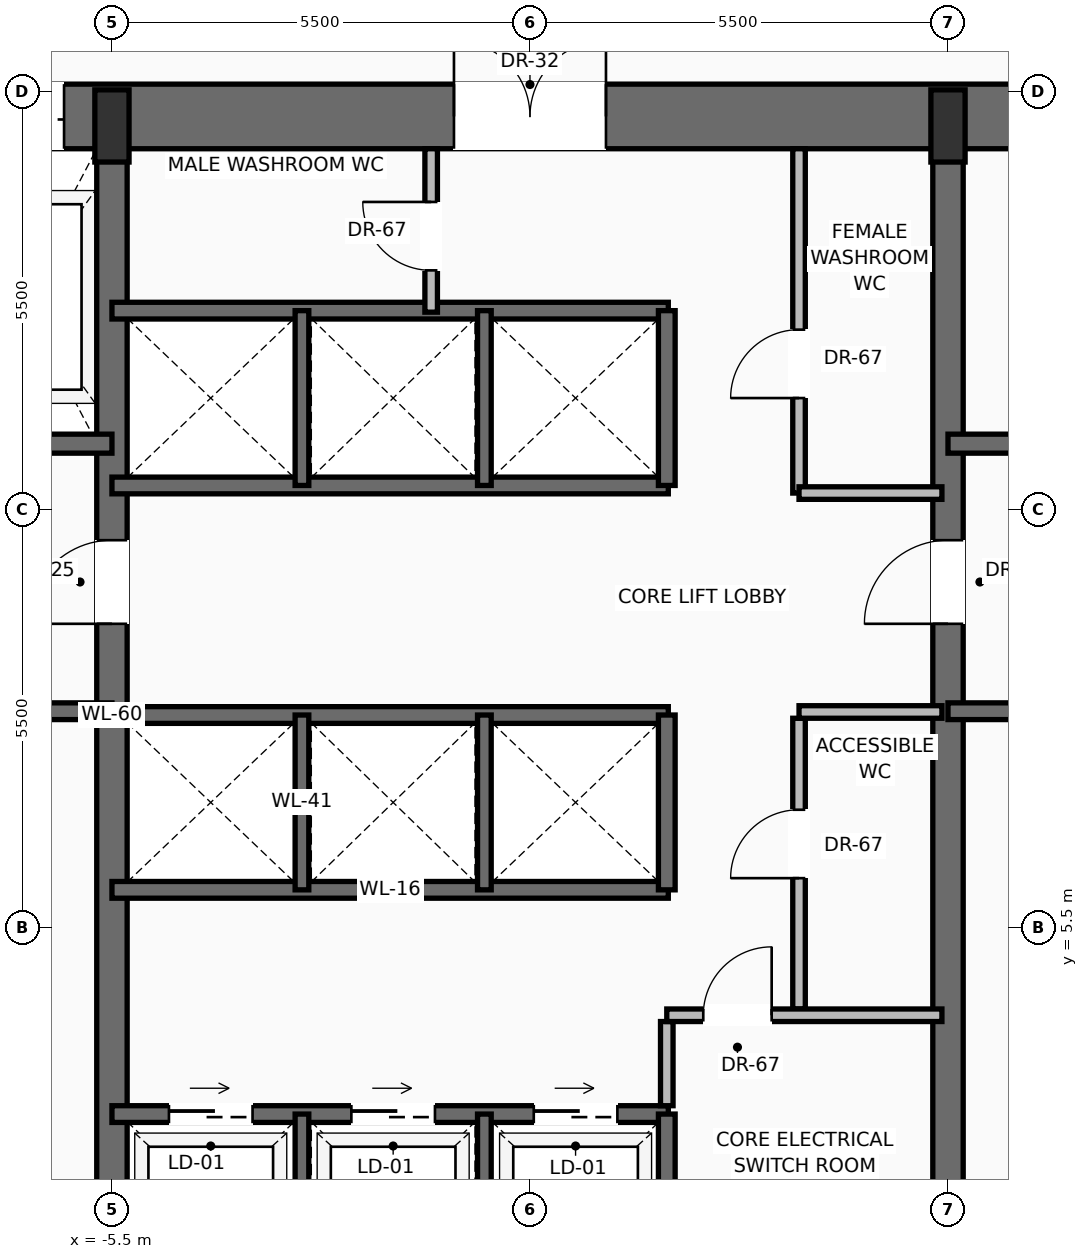
"""IFC4 building model, lengths in metres.
Left out: names, types, materials, properties, quantities, classifications, styles, units other than length and angle.
Written with IfcOpenShell. Run it as: python <this file> out.ifc"""

import sys

from ifc_helpers import new_model, si_unit, direction, frame, frame_2d, origin, origin_2d, place, context, subcontext, project, spatial, rectangle, extrude, source, transform, mapped, element, fill, save


model = new_model("IFC4")
c1 = context("Model", 3, precision=1e-05, world=origin(), true_north=direction((0.0, 1.0)))
c2 = subcontext(c1, "Body", "Model", "MODEL_VIEW")
j1 = project(units=[si_unit("LENGTHUNIT", "METRE"), si_unit("PLANEANGLEUNIT", "RADIAN")], contexts=[c1])
p1 = place(None, origin())
s1 = spatial("IfcSite", under=j1, at=p1, CompositionType="ELEMENT")
p2 = place(p1, origin())
s2 = spatial("IfcBuilding", under=s1, at=p2, CompositionType="ELEMENT")
p3 = place(p2, frame((0.0, 0.0, 64.5)))
s3 = spatial("IfcBuildingStorey", under=s2, at=p3, CompositionType="ELEMENT", Elevation=64.5)
p4 = place(p3, frame((-11.0, 16.175, 0.0), z_axis=(0.0, 0.0, 1.0), x_axis=(1.0, 0.0, 0.0)))
e1 = element("IfcWall", 1, at=p4, inside=s3, PredefinedType="SHEAR", context=c2, shape_type="SweptSolid", body=[
    extrude(rectangle(XDim=22.0, YDim=0.85, at=frame_2d((11.0, 0.0))), origin(), (0.0, 0.0, 1.0), 3.45),
])
p5 = place(p4, frame((3.57, 0.0, 0.0)))
e2 = element("IfcOpeningElement", 2, at=p5, cuts=e1, PredefinedType="OPENING", context=c2, shape_type="SweptSolid", body=[
    extrude(rectangle(XDim=1.3, YDim=2.3, at=frame_2d((0.65, 1.15))), frame((0.0, 0.435, 0.0), z_axis=(0.0, -1.0, 0.0), x_axis=(1.0, 0.0, 0.0)), (0.0, 0.0, 1.0), 0.87),
])
p6 = place(p4, frame((10.0, 0.0, 0.0)))
e3 = element("IfcOpeningElement", 3, at=p6, cuts=e1, PredefinedType="OPENING", context=c2, shape_type="SweptSolid", body=[
    extrude(rectangle(XDim=2.0, YDim=2.4, at=frame_2d((1.0, 1.2))), frame((0.0, 0.435, 0.0), z_axis=(0.0, -1.0, 0.0), x_axis=(1.0, 0.0, 0.0)), (0.0, 0.0, 1.0), 0.87),
])
p7 = place(p3, frame((-5.5, 0.425, 0.0), z_axis=(0.0, 0.0, 1.0), x_axis=(0.0, 1.0, 0.0)))
e4 = element("IfcWall", 4, at=p7, inside=s3, PredefinedType="SHEAR", context=c2, shape_type="SweptSolid", body=[
    extrude(rectangle(XDim=15.75, YDim=0.4, at=frame_2d((7.875, 0.0))), origin(), (0.0, 0.0, 1.0), 3.45),
])
p8 = place(p7, frame((9.075, 0.0, 0.0)))
e5 = element("IfcOpeningElement", 5, at=p8, cuts=e4, PredefinedType="OPENING", context=c2, shape_type="SweptSolid", body=[
    extrude(rectangle(XDim=1.1, YDim=2.2, at=frame_2d((0.55, 1.1))), frame((0.0, 0.21, 0.0), z_axis=(0.0, -1.0, 0.0), x_axis=(1.0, 0.0, 0.0)), (0.0, 0.0, 1.0), 0.42),
])
p9 = place(p3, frame((5.5, 0.425, 0.0), z_axis=(0.0, 0.0, 1.0), x_axis=(0.0, 1.0, 0.0)))
e6 = element("IfcWall", 6, at=p9, inside=s3, PredefinedType="SHEAR", context=c2, shape_type="SweptSolid", body=[
    extrude(rectangle(XDim=15.75, YDim=0.4, at=frame_2d((7.875, 0.0))), origin(), (0.0, 0.0, 1.0), 3.45),
])
p10 = place(p9, frame((9.075, 0.0, 0.0)))
e7 = element("IfcOpeningElement", 7, at=p10, cuts=e6, PredefinedType="OPENING", context=c2, shape_type="SweptSolid", body=[
    extrude(rectangle(XDim=1.1, YDim=2.2, at=frame_2d((0.55, 1.1))), frame((0.0, 0.21, 0.0), z_axis=(0.0, -1.0, 0.0), x_axis=(1.0, 0.0, 0.0)), (0.0, 0.0, 1.0), 0.42),
])
m1 = source(origin(), c2, "Body", "SweptSolid", [
    extrude(rectangle(XDim=0.45, YDim=0.95, at=origin_2d()), origin(), (0.0, 0.0, 1.0), 3.7),
])
for number, where, z_axis, x_axis in (
    (8, (-5.5, 16.05, 0.0), (0.0, 0.0, 1.0), (1.0, 0.0, 0.0)),
    (9, (5.5, 16.05, 0.0), (0.0, 0.0, 1.0), (1.0, 0.0, 0.0)),
):
    element("IfcColumn", number, at=place(p3, frame(where, z_axis=z_axis, x_axis=x_axis)), inside=s3, PredefinedType="PILASTER", context=c2, shape_type="MappedRepresentation", body=[
        mapped(m1, transform((0.0, 0.0, 0.0), scale=1.0)),
    ])
p11 = place(p3, frame((-5.5, 8.35, 0.0), z_axis=(0.0, 0.0, 1.0), x_axis=(-1.0, 0.0, 0.0)))
e10 = element("IfcWall", 10, at=p11, inside=s3, PredefinedType="SOLIDWALL", context=c2, shape_type="SweptSolid", body=[
    extrude(rectangle(XDim=4.65, YDim=0.22, at=frame_2d((2.325, 0.0))), origin(), (0.0, 0.0, 1.0), 3.45),
])
p12 = place(p11, frame((2.5, 0.0, 0.0)))
e11 = element("IfcOpeningElement", 11, at=p12, cuts=e10, PredefinedType="OPENING", context=c2, shape_type="SweptSolid", body=[
    extrude(rectangle(XDim=1.15, YDim=2.2, at=frame_2d((0.575, 1.1))), frame((0.0, 0.12, 0.0), z_axis=(0.0, -1.0, 0.0), x_axis=(1.0, 0.0, 0.0)), (0.0, 0.0, 1.0), 0.24),
])
p13 = place(p3, frame((-5.5, 11.87, 0.0), z_axis=(0.0, 0.0, 1.0), x_axis=(-1.0, 0.0, 0.0)))
e12 = element("IfcWall", 12, at=p13, inside=s3, PredefinedType="SOLIDWALL", context=c2, shape_type="SweptSolid", body=[
    extrude(rectangle(XDim=4.65, YDim=0.25, at=frame_2d((2.325, 0.0))), origin(), (0.0, 0.0, 1.0), 3.45),
])
p14 = place(p13, frame((2.95, 0.0, 0.0)))
e13 = element("IfcOpeningElement", 13, at=p14, cuts=e12, PredefinedType="OPENING", context=c2, shape_type="SweptSolid", body=[
    extrude(rectangle(XDim=1.2, YDim=2.25, at=frame_2d((0.6, 1.125))), frame((0.0, 0.135, 0.0), z_axis=(0.0, -1.0, 0.0), x_axis=(1.0, 0.0, 0.0)), (0.0, 0.0, 1.0), 0.27),
])
p15 = place(p3, frame((10.15, 8.35, 0.0), z_axis=(0.0, 0.0, 1.0), x_axis=(-1.0, 0.0, 0.0)))
e14 = element("IfcWall", 14, at=p15, inside=s3, PredefinedType="SOLIDWALL", context=c2, shape_type="SweptSolid", body=[
    extrude(rectangle(XDim=4.65, YDim=0.22, at=frame_2d((2.325, 0.0))), origin(), (0.0, 0.0, 1.0), 3.45),
])
p16 = place(p15, frame((1.0, 0.0, 0.0)))
e15 = element("IfcOpeningElement", 15, at=p16, cuts=e14, PredefinedType="OPENING", context=c2, shape_type="SweptSolid", body=[
    extrude(rectangle(XDim=1.15, YDim=2.2, at=frame_2d((0.575, 1.1))), frame((0.0, 0.12, 0.0), z_axis=(0.0, -1.0, 0.0), x_axis=(1.0, 0.0, 0.0)), (0.0, 0.0, 1.0), 0.24),
])
p17 = place(p3, frame((10.15, 11.87, 0.0), z_axis=(0.0, 0.0, 1.0), x_axis=(-1.0, 0.0, 0.0)))
e16 = element("IfcWall", 16, at=p17, inside=s3, PredefinedType="SOLIDWALL", context=c2, shape_type="SweptSolid", body=[
    extrude(rectangle(XDim=4.65, YDim=0.25, at=frame_2d((2.325, 0.0))), origin(), (0.0, 0.0, 1.0), 3.45),
])
p18 = place(p17, frame((0.5, 0.0, 0.0)))
e17 = element("IfcOpeningElement", 17, at=p18, cuts=e16, PredefinedType="OPENING", context=c2, shape_type="SweptSolid", body=[
    extrude(rectangle(XDim=1.2, YDim=2.25, at=frame_2d((0.6, 1.125))), frame((0.0, 0.135, 0.0), z_axis=(0.0, -1.0, 0.0), x_axis=(1.0, 0.0, 0.0)), (0.0, 0.0, 1.0), 0.27),
])
p19 = place(p3, frame((-5.5, 3.05, 0.0), z_axis=(0.0, 0.0, 1.0), x_axis=(1.0, 0.0, 0.0)))
e18 = element("IfcWall", 18, at=p19, inside=s3, PredefinedType="SOLIDWALL", context=c2, shape_type="SweptSolid", body=[
    extrude(rectangle(XDim=7.32, YDim=0.22, at=frame_2d((3.66, 0.0))), origin(), (0.0, 0.0, 1.0), 3.45),
])
p20 = place(p19, frame((0.75, 0.0, 0.0)))
e19 = element("IfcOpeningElement", 19, at=p20, cuts=e18, PredefinedType="OPENING", context=c2, shape_type="SweptSolid", body=[
    extrude(rectangle(XDim=1.1, YDim=2.2, at=frame_2d((0.55, 1.1))), frame((0.0, 0.12, 0.0), z_axis=(0.0, -1.0, 0.0), x_axis=(1.0, 0.0, 0.0)), (0.0, 0.0, 1.0), 0.24),
])
p21 = place(p19, frame((3.15, 0.0, 0.0)))
e20 = element("IfcOpeningElement", 20, at=p21, cuts=e18, PredefinedType="OPENING", context=c2, shape_type="SweptSolid", body=[
    extrude(rectangle(XDim=1.1, YDim=2.2, at=frame_2d((0.55, 1.1))), frame((0.0, 0.12, 0.0), z_axis=(0.0, -1.0, 0.0), x_axis=(1.0, 0.0, 0.0)), (0.0, 0.0, 1.0), 0.24),
])
p22 = place(p19, frame((5.55, 0.0, 0.0)))
e21 = element("IfcOpeningElement", 21, at=p22, cuts=e18, PredefinedType="OPENING", context=c2, shape_type="SweptSolid", body=[
    extrude(rectangle(XDim=1.1, YDim=2.2, at=frame_2d((0.55, 1.1))), frame((0.0, 0.12, 0.0), z_axis=(0.0, -1.0, 0.0), x_axis=(1.0, 0.0, 0.0)), (0.0, 0.0, 1.0), 0.24),
])
p23 = place(p3, frame((1.8, 0.85, 0.0), z_axis=(0.0, 0.0, 1.0), x_axis=(0.0, 1.0, 0.0)))
e22 = element("IfcWall", 22, at=p23, inside=s3, PredefinedType="SOLIDWALL", context=c2, shape_type="SweptSolid", body=[
    extrude(rectangle(XDim=2.2, YDim=0.22, at=frame_2d((1.1, 0.0))), origin(), (0.0, 0.0, 1.0), 3.45),
])
for number, where, z_axis, x_axis in (
    (23, (-3.0, 0.85, 0.0), (0.0, 0.0, 1.0), (0.0, 1.0, 0.0)),
    (24, (-0.6, 0.85, 0.0), (0.0, 0.0, 1.0), (0.0, 1.0, 0.0)),
):
    element("IfcWall", number, at=place(p3, frame(where, z_axis=z_axis, x_axis=x_axis)), inside=s3, PredefinedType="SOLIDWALL", context=c2, shape_type="SweptSolid", body=[
        extrude(rectangle(XDim=2.2, YDim=0.18, at=frame_2d((1.1, 0.0))), origin(), (0.0, 0.0, 1.0), 3.45),
    ])
p24 = place(p3, frame((1.8, 3.16, 0.0), z_axis=(0.0, 0.0, 1.0), x_axis=(0.0, 1.0, 0.0)))
e25 = element("IfcWall", 25, at=p24, inside=s3, PredefinedType="PARTITIONING", context=c2, shape_type="SweptSolid", body=[
    extrude(rectangle(XDim=1.108, YDim=0.165, at=frame_2d((0.554, 0.0))), origin(), (0.0, 0.0, 1.0), 3.442),
])
p25 = place(p3, frame((3.54, 4.433, 0.0), z_axis=(0.0, 0.0, 1.0), x_axis=(0.0, 1.0, 0.0)))
e26 = element("IfcWall", 26, at=p25, inside=s3, PredefinedType="PARTITIONING", context=c2, shape_type="SweptSolid", body=[
    extrude(rectangle(XDim=3.825, YDim=0.165, at=frame_2d((1.913, 0.0))), origin(), (0.0, 0.0, 1.0), 3.442),
])
p26 = place(p25, frame((1.721, 0.0, 0.0)))
e27 = element("IfcOpeningElement", 27, at=p26, cuts=e26, PredefinedType="OPENING", context=c2, shape_type="SweptSolid", body=[
    extrude(rectangle(XDim=0.9, YDim=2.1, at=frame_2d((0.45, 1.05))), frame((0.0, 0.093, 0.0), z_axis=(0.0, -1.0, 0.0), x_axis=(1.0, 0.0, 0.0)), (0.0, 0.0, 1.0), 0.185),
])
p27 = place(p3, frame((3.54, 8.34, 0.0), z_axis=(0.0, 0.0, 1.0), x_axis=(1.0, 0.0, 0.0)))
e28 = element("IfcWall", 28, at=p27, inside=s3, PredefinedType="PARTITIONING", context=c2, shape_type="SweptSolid", body=[
    extrude(rectangle(XDim=1.88, YDim=0.165, at=frame_2d((0.94, 0.0))), origin(), (0.0, 0.0, 1.0), 3.442),
])
p28 = place(p3, frame((1.8, 4.35, 0.0), z_axis=(0.0, 0.0, 1.0), x_axis=(1.0, 0.0, 0.0)))
e29 = element("IfcWall", 29, at=p28, inside=s3, PredefinedType="PARTITIONING", context=c2, shape_type="SweptSolid", body=[
    extrude(rectangle(XDim=3.62, YDim=0.165, at=frame_2d((1.81, 0.0))), origin(), (0.0, 0.0, 1.0), 3.442),
])
p29 = place(p28, frame((0.48, 0.0, 0.0)))
e30 = element("IfcOpeningElement", 30, at=p29, cuts=e29, PredefinedType="OPENING", context=c2, shape_type="SweptSolid", body=[
    extrude(rectangle(XDim=0.9, YDim=2.1, at=frame_2d((0.45, 1.05))), frame((0.0, 0.093, 0.0), z_axis=(0.0, -1.0, 0.0), x_axis=(1.0, 0.0, 0.0)), (0.0, 0.0, 1.0), 0.185),
])
for number, where, z_axis, x_axis in (
    (31, (-5.5, 6.0, 0.0), (0.0, 0.0, 1.0), (1.0, 0.0, 0.0)),
    (32, (-5.5, 8.3, 0.0), (0.0, 0.0, 1.0), (1.0, 0.0, 0.0)),
):
    element("IfcWall", number, at=place(p3, frame(where, z_axis=z_axis, x_axis=x_axis)), inside=s3, PredefinedType="SOLIDWALL", context=c2, shape_type="SweptSolid", body=[
        extrude(rectangle(XDim=7.32, YDim=0.22, at=frame_2d((3.66, 0.0))), origin(), (0.0, 0.0, 1.0), 3.45),
    ])
p30 = place(p3, frame((1.8, 6.0, 0.0), z_axis=(0.0, 0.0, 1.0), x_axis=(0.0, 1.0, 0.0)))
e33 = element("IfcWall", 33, at=p30, inside=s3, PredefinedType="SOLIDWALL", context=c2, shape_type="SweptSolid", body=[
    extrude(rectangle(XDim=2.3, YDim=0.22, at=frame_2d((1.15, 0.0))), origin(), (0.0, 0.0, 1.0), 3.45),
])
for number, where, z_axis, x_axis in (
    (34, (-3.0, 6.0, 0.0), (0.0, 0.0, 1.0), (0.0, 1.0, 0.0)),
    (35, (-0.6, 6.0, 0.0), (0.0, 0.0, 1.0), (0.0, 1.0, 0.0)),
):
    element("IfcWall", number, at=place(p3, frame(where, z_axis=z_axis, x_axis=x_axis)), inside=s3, PredefinedType="SOLIDWALL", context=c2, shape_type="SweptSolid", body=[
        extrude(rectangle(XDim=2.3, YDim=0.18, at=frame_2d((1.15, 0.0))), origin(), (0.0, 0.0, 1.0), 3.45),
    ])
for number, where, z_axis, x_axis in (
    (36, (-5.5, 11.32, 0.0), (0.0, 0.0, 1.0), (1.0, 0.0, 0.0)),
    (37, (-5.5, 13.62, 0.0), (0.0, 0.0, 1.0), (1.0, 0.0, 0.0)),
):
    element("IfcWall", number, at=place(p3, frame(where, z_axis=z_axis, x_axis=x_axis)), inside=s3, PredefinedType="SOLIDWALL", context=c2, shape_type="SweptSolid", body=[
        extrude(rectangle(XDim=7.32, YDim=0.22, at=frame_2d((3.66, 0.0))), origin(), (0.0, 0.0, 1.0), 3.45),
    ])
p31 = place(p3, frame((1.8, 11.32, 0.0), z_axis=(0.0, 0.0, 1.0), x_axis=(0.0, 1.0, 0.0)))
e38 = element("IfcWall", 38, at=p31, inside=s3, PredefinedType="SOLIDWALL", context=c2, shape_type="SweptSolid", body=[
    extrude(rectangle(XDim=2.3, YDim=0.22, at=frame_2d((1.15, 0.0))), origin(), (0.0, 0.0, 1.0), 3.45),
])
for number, where, z_axis, x_axis in (
    (39, (-3.0, 11.32, 0.0), (0.0, 0.0, 1.0), (0.0, 1.0, 0.0)),
    (40, (-0.6, 11.32, 0.0), (0.0, 0.0, 1.0), (0.0, 1.0, 0.0)),
):
    element("IfcWall", number, at=place(p3, frame(where, z_axis=z_axis, x_axis=x_axis)), inside=s3, PredefinedType="SOLIDWALL", context=c2, shape_type="SweptSolid", body=[
        extrude(rectangle(XDim=2.3, YDim=0.18, at=frame_2d((1.15, 0.0))), origin(), (0.0, 0.0, 1.0), 3.45),
    ])
p32 = place(p3, frame((-1.3, 13.6, 0.0), z_axis=(0.0, 0.0, 1.0), x_axis=(0.0, 1.0, 0.0)))
e41 = element("IfcWall", 41, at=p32, inside=s3, PredefinedType="PARTITIONING", context=c2, shape_type="SweptSolid", body=[
    extrude(rectangle(XDim=2.15, YDim=0.165, at=frame_2d((1.075, 0.0))), origin(), (0.0, 0.0, 1.0), 3.442),
])
p33 = place(p32, frame((0.55, 0.0, 0.0)))
e42 = element("IfcOpeningElement", 42, at=p33, cuts=e41, PredefinedType="OPENING", context=c2, shape_type="SweptSolid", body=[
    extrude(rectangle(XDim=0.9, YDim=2.1, at=frame_2d((0.45, 1.05))), frame((0.0, 0.093, 0.0), z_axis=(0.0, -1.0, 0.0), x_axis=(1.0, 0.0, 0.0)), (0.0, 0.0, 1.0), 0.185),
])
p34 = place(p3, frame((3.54, 11.22, 0.0), z_axis=(0.0, 0.0, 1.0), x_axis=(0.0, 1.0, 0.0)))
e43 = element("IfcWall", 43, at=p34, inside=s3, PredefinedType="PARTITIONING", context=c2, shape_type="SweptSolid", body=[
    extrude(rectangle(XDim=4.53, YDim=0.165, at=frame_2d((2.265, 0.0))), origin(), (0.0, 0.0, 1.0), 3.442),
])
p35 = place(p34, frame((1.25, 0.0, 0.0)))
e44 = element("IfcOpeningElement", 44, at=p35, cuts=e43, PredefinedType="OPENING", context=c2, shape_type="SweptSolid", body=[
    extrude(rectangle(XDim=0.9, YDim=2.1, at=frame_2d((0.45, 1.05))), frame((0.0, 0.093, 0.0), z_axis=(0.0, -1.0, 0.0), x_axis=(1.0, 0.0, 0.0)), (0.0, 0.0, 1.0), 0.185),
])
p36 = place(p3, frame((3.54, 11.22, 0.0), z_axis=(0.0, 0.0, 1.0), x_axis=(1.0, 0.0, 0.0)))
e45 = element("IfcWall", 45, at=p36, inside=s3, PredefinedType="PARTITIONING", context=c2, shape_type="SweptSolid", body=[
    extrude(rectangle(XDim=1.88, YDim=0.165, at=frame_2d((0.94, 0.0))), origin(), (0.0, 0.0, 1.0), 3.442),
])
m2 = source(origin(), c2, "Body", "SweptSolid", [
    extrude(rectangle(XDim=1.1, YDim=2.2, at=frame_2d((0.55, 1.1))), frame((0.0, 0.025, 0.0), z_axis=(0.0, -1.0, 0.0), x_axis=(1.0, 0.0, 0.0)), (0.0, 0.0, 1.0), 0.05),
])
p37 = place(p8, origin())
e46 = element("IfcDoor", 46, at=p37, inside=s3, OperationType="SINGLE_SWING_LEFT", PredefinedType="DOOR", context=c2, shape_type="MappedRepresentation", body=[
    mapped(m2, transform((0.0, 0.0, 0.0), scale=1.0)),
])
fill(e5, e46)
m3 = source(origin(), c2, "Body", "SweptSolid", [
    extrude(rectangle(XDim=1.3, YDim=2.3, at=frame_2d((0.65, 1.15))), frame((0.0, 0.025, 0.0), z_axis=(0.0, -1.0, 0.0), x_axis=(1.0, 0.0, 0.0)), (0.0, 0.0, 1.0), 0.05),
])
p38 = place(p5, origin())
e47 = element("IfcDoor", 47, at=p38, inside=s3, OperationType="SLIDING_TO_RIGHT", PredefinedType="DOOR", context=c2, shape_type="MappedRepresentation", body=[
    mapped(m3, transform((0.0, 0.0, 0.0), scale=1.0)),
])
fill(e2, e47)
p39 = place(p10, origin())
e48 = element("IfcDoor", 48, at=p39, inside=s3, OperationType="SINGLE_SWING_LEFT", PredefinedType="DOOR", context=c2, shape_type="MappedRepresentation", body=[
    mapped(m2, transform((0.0, 0.0, 0.0), scale=1.0)),
])
fill(e7, e48)
m4 = source(origin(), c2, "Body", "SweptSolid", [
    extrude(rectangle(XDim=2.0, YDim=2.4, at=frame_2d((1.0, 1.2))), frame((0.0, 0.025, 0.0), z_axis=(0.0, -1.0, 0.0), x_axis=(1.0, 0.0, 0.0)), (0.0, 0.0, 1.0), 0.05),
])
p40 = place(p6, origin())
e49 = element("IfcDoor", 49, at=p40, inside=s3, OperationType="DOUBLE_DOOR_SINGLE_SWING", PredefinedType="DOOR", context=c2, shape_type="MappedRepresentation", body=[
    mapped(m4, transform((0.0, 0.0, 0.0), scale=1.0)),
])
fill(e3, e49)
m5 = source(origin(), c2, "Body", "SweptSolid", [
    extrude(rectangle(XDim=1.1, YDim=2.2, at=frame_2d((0.55, 1.1))), frame((0.0, 0.025, 0.0), z_axis=(0.0, -1.0, 0.0), x_axis=(1.0, 0.0, 0.0)), (0.0, 0.0, 1.0), 0.05),
])
p41 = place(p20, origin())
e50 = element("IfcDoor", 50, at=p41, inside=s3, OperationType="SLIDING_TO_RIGHT", PredefinedType="DOOR", context=c2, shape_type="MappedRepresentation", body=[
    mapped(m5, transform((0.0, 0.0, 0.0), scale=1.0)),
])
fill(e19, e50)
p42 = place(p21, origin())
e51 = element("IfcDoor", 51, at=p42, inside=s3, OperationType="SLIDING_TO_RIGHT", PredefinedType="DOOR", context=c2, shape_type="MappedRepresentation", body=[
    mapped(m5, transform((0.0, 0.0, 0.0), scale=1.0)),
])
fill(e20, e51)
p43 = place(p22, origin())
e52 = element("IfcDoor", 52, at=p43, inside=s3, OperationType="SLIDING_TO_RIGHT", PredefinedType="DOOR", context=c2, shape_type="MappedRepresentation", body=[
    mapped(m5, transform((0.0, 0.0, 0.0), scale=1.0)),
])
fill(e21, e52)
m6 = source(origin(), c2, "Body", "SweptSolid", [
    extrude(rectangle(XDim=0.9, YDim=2.1, at=frame_2d((0.45, 1.05))), frame((0.0, 0.025, 0.0), z_axis=(0.0, -1.0, 0.0), x_axis=(1.0, 0.0, 0.0)), (0.0, 0.0, 1.0), 0.05),
])
p44 = place(p29, origin())
e53 = element("IfcDoor", 53, at=p44, inside=s3, OperationType="SINGLE_SWING_RIGHT", PredefinedType="DOOR", context=c2, shape_type="MappedRepresentation", body=[
    mapped(m6, transform((0.0, 0.0, 0.0), scale=1.0)),
])
fill(e30, e53)
p45 = place(p26, origin())
e54 = element("IfcDoor", 54, at=p45, inside=s3, OperationType="SINGLE_SWING_LEFT", PredefinedType="DOOR", context=c2, shape_type="MappedRepresentation", body=[
    mapped(m6, transform((0.0, 0.0, 0.0), scale=1.0)),
])
fill(e27, e54)
p46 = place(p33, origin())
e55 = element("IfcDoor", 55, at=p46, inside=s3, OperationType="SINGLE_SWING_RIGHT", PredefinedType="DOOR", context=c2, shape_type="MappedRepresentation", body=[
    mapped(m6, transform((0.0, 0.0, 0.0), scale=1.0)),
])
fill(e42, e55)
p47 = place(p35, origin())
e56 = element("IfcDoor", 56, at=p47, inside=s3, OperationType="SINGLE_SWING_LEFT", PredefinedType="DOOR", context=c2, shape_type="MappedRepresentation", body=[
    mapped(m6, transform((0.0, 0.0, 0.0), scale=1.0)),
])
fill(e44, e56)
save(model, sys.argv[1])
